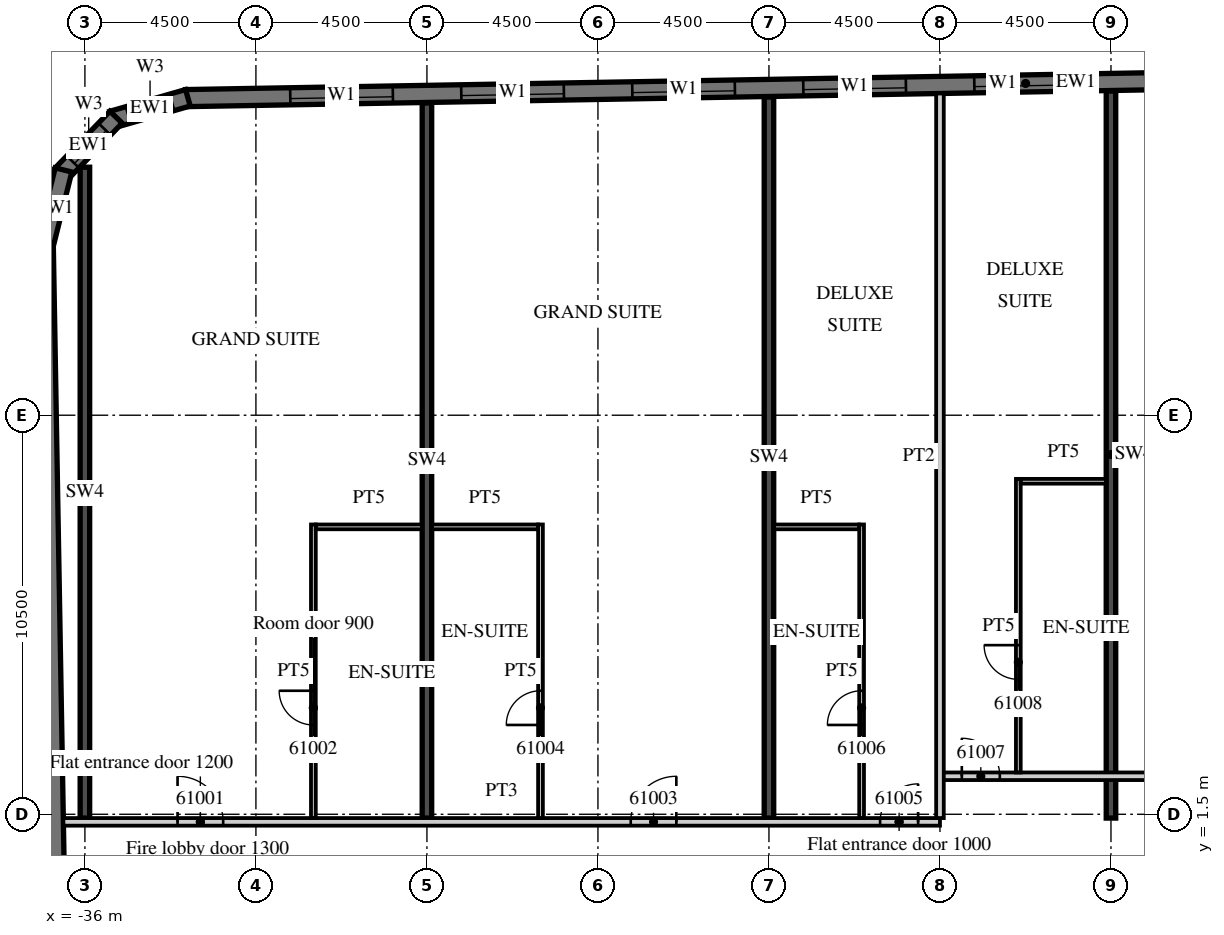
"""IFC4 building model, lengths in metres.
Left out: names, types, materials, properties, quantities, classifications, styles, units other than length and angle.
Written with IfcOpenShell. Run it as: python <this file> out.ifc"""

import sys

from ifc_helpers import new_model, si_unit, direction, frame, frame_2d, origin, place, context, subcontext, project, spatial, polyline, rectangle, outline, extrude, element, fill, save


model = new_model("IFC4")
c1 = context("Model", 3, precision=1e-05, world=origin(), true_north=direction((0.0, 1.0)))
c2 = subcontext(c1, "Body", "Model", "MODEL_VIEW")
j1 = project(units=[si_unit("LENGTHUNIT", "METRE"), si_unit("PLANEANGLEUNIT", "RADIAN")], contexts=[c1])
p1 = place(None, origin())
s1 = spatial("IfcSite", under=j1, at=p1, CompositionType="ELEMENT")
p2 = place(p1, origin())
s2 = spatial("IfcBuilding", under=s1, at=p2, CompositionType="ELEMENT")
p3 = place(p2, frame((0.0, 0.0, 247.4)))
s3 = spatial("IfcBuildingStorey", under=s2, at=p3, CompositionType="ELEMENT", Elevation=247.4)
p4 = place(p3, frame((-36.0, 1.4, 0.0), z_axis=(0.0, 0.0, 1.0), x_axis=(0.0, 1.0, 0.0)))
e1 = element("IfcWall", 1, at=p4, inside=s3, PredefinedType="SHEAR", context=c2, shape_type="SweptSolid", body=[
    extrude(rectangle(XDim=17.125, YDim=0.25, at=frame_2d((8.563, 0.0))), origin(), (0.0, 0.0, 1.0), 3.3),
])
p5 = place(p3, frame((-27.0, 1.4, 0.0), z_axis=(0.0, 0.0, 1.0), x_axis=(0.0, 1.0, 0.0)))
e2 = element("IfcWall", 2, at=p5, inside=s3, PredefinedType="SHEAR", context=c2, shape_type="SweptSolid", body=[
    extrude(rectangle(XDim=18.817, YDim=0.25, at=frame_2d((9.409, 0.0))), origin(), (0.0, 0.0, 1.0), 3.3),
])
p6 = place(p3, frame((-18.0, 1.4, 0.0), z_axis=(0.0, 0.0, 1.0), x_axis=(0.0, 1.0, 0.0)))
e3 = element("IfcWall", 3, at=p6, inside=s3, PredefinedType="SHEAR", context=c2, shape_type="SweptSolid", body=[
    extrude(rectangle(XDim=18.974, YDim=0.25, at=frame_2d((9.487, 0.0))), origin(), (0.0, 0.0, 1.0), 3.3),
])
p7 = place(p3, frame((-9.0, 1.4, 0.0), z_axis=(0.0, 0.0, 1.0), x_axis=(0.0, 1.0, 0.0)))
e4 = element("IfcWall", 4, at=p7, inside=s3, PredefinedType="SHEAR", context=c2, shape_type="SweptSolid", body=[
    extrude(rectangle(XDim=19.132, YDim=0.25, at=frame_2d((9.566, 0.0))), origin(), (0.0, 0.0, 1.0), 3.3),
])
p8 = place(p3, frame((-37.057, 16.503, 0.0), z_axis=(0.0, 0.0, 1.0), x_axis=(0.017452279857, -0.999847697366, 0.0)))
e5 = element("IfcWall", 5, at=p8, inside=s3, PredefinedType="SOLIDWALL", context=c2, shape_type="SweptSolid", body=[
    extrude(rectangle(XDim=33.0, YDim=0.45, at=frame_2d((16.5, 0.0))), origin(), (0.0, 0.0, 1.0), 3.02),
])
p9 = place(p3, frame((13.504, 21.161, 0.0), z_axis=(0.0, 0.0, 1.0), x_axis=(-0.999847763257, -0.017448504532, 0.0)))
e6 = element("IfcWall", 6, at=p9, inside=s3, PredefinedType="SOLIDWALL", context=c2, shape_type="SweptSolid", body=[
    extrude(rectangle(XDim=46.859, YDim=0.45, at=frame_2d((23.43, 0.0))), origin(), (0.0, 0.0, 1.0), 3.02),
])
p10 = place(p9, frame((0.9, 0.0, 0.45)))
e7 = element("IfcOpeningElement", 7, at=p10, cuts=e6, PredefinedType="OPENING", context=c2, shape_type="SweptSolid", body=[
    extrude(rectangle(XDim=2.7, YDim=2.25, at=frame_2d((1.35, 1.125))), frame((0.0, 0.235, 0.0), z_axis=(0.0, -1.0, 0.0), x_axis=(1.0, 0.0, 0.0)), (0.0, 0.0, 1.0), 0.47),
])
p11 = place(p9, frame((5.401, 0.0, 0.45)))
e8 = element("IfcOpeningElement", 8, at=p11, cuts=e6, PredefinedType="OPENING", context=c2, shape_type="SweptSolid", body=[
    extrude(rectangle(XDim=2.7, YDim=2.25, at=frame_2d((1.35, 1.125))), frame((0.0, 0.235, 0.0), z_axis=(0.0, -1.0, 0.0), x_axis=(1.0, 0.0, 0.0)), (0.0, 0.0, 1.0), 0.47),
])
p12 = place(p9, frame((9.902, 0.0, 0.45)))
e9 = element("IfcOpeningElement", 9, at=p12, cuts=e6, PredefinedType="OPENING", context=c2, shape_type="SweptSolid", body=[
    extrude(rectangle(XDim=2.7, YDim=2.25, at=frame_2d((1.35, 1.125))), frame((0.0, 0.235, 0.0), z_axis=(0.0, -1.0, 0.0), x_axis=(1.0, 0.0, 0.0)), (0.0, 0.0, 1.0), 0.47),
])
p13 = place(p9, frame((14.402, 0.0, 0.45)))
e10 = element("IfcOpeningElement", 10, at=p13, cuts=e6, PredefinedType="OPENING", context=c2, shape_type="SweptSolid", body=[
    extrude(rectangle(XDim=2.7, YDim=2.25, at=frame_2d((1.35, 1.125))), frame((0.0, 0.235, 0.0), z_axis=(0.0, -1.0, 0.0), x_axis=(1.0, 0.0, 0.0)), (0.0, 0.0, 1.0), 0.47),
])
p14 = place(p9, frame((18.903, 0.0, 0.45)))
e11 = element("IfcOpeningElement", 11, at=p14, cuts=e6, PredefinedType="OPENING", context=c2, shape_type="SweptSolid", body=[
    extrude(rectangle(XDim=2.7, YDim=2.25, at=frame_2d((1.35, 1.125))), frame((0.0, 0.235, 0.0), z_axis=(0.0, -1.0, 0.0), x_axis=(1.0, 0.0, 0.0)), (0.0, 0.0, 1.0), 0.47),
])
p15 = place(p9, frame((23.404, 0.0, 0.45)))
e12 = element("IfcOpeningElement", 12, at=p15, cuts=e6, PredefinedType="OPENING", context=c2, shape_type="SweptSolid", body=[
    extrude(rectangle(XDim=2.7, YDim=2.25, at=frame_2d((1.35, 1.125))), frame((0.0, 0.235, 0.0), z_axis=(0.0, -1.0, 0.0), x_axis=(1.0, 0.0, 0.0)), (0.0, 0.0, 1.0), 0.47),
])
p16 = place(p9, frame((27.904, 0.0, 0.45)))
e13 = element("IfcOpeningElement", 13, at=p16, cuts=e6, PredefinedType="OPENING", context=c2, shape_type="SweptSolid", body=[
    extrude(rectangle(XDim=2.7, YDim=2.25, at=frame_2d((1.35, 1.125))), frame((0.0, 0.235, 0.0), z_axis=(0.0, -1.0, 0.0), x_axis=(1.0, 0.0, 0.0)), (0.0, 0.0, 1.0), 0.47),
])
p17 = place(p9, frame((32.405, 0.0, 0.45)))
e14 = element("IfcOpeningElement", 14, at=p17, cuts=e6, PredefinedType="OPENING", context=c2, shape_type="SweptSolid", body=[
    extrude(rectangle(XDim=2.7, YDim=2.25, at=frame_2d((1.35, 1.125))), frame((0.0, 0.235, 0.0), z_axis=(0.0, -1.0, 0.0), x_axis=(1.0, 0.0, 0.0)), (0.0, 0.0, 1.0), 0.47),
])
p18 = place(p9, frame((36.906, 0.0, 0.45)))
e15 = element("IfcOpeningElement", 15, at=p18, cuts=e6, PredefinedType="OPENING", context=c2, shape_type="SweptSolid", body=[
    extrude(rectangle(XDim=2.7, YDim=2.25, at=frame_2d((1.35, 1.125))), frame((0.0, 0.235, 0.0), z_axis=(0.0, -1.0, 0.0), x_axis=(1.0, 0.0, 0.0)), (0.0, 0.0, 1.0), 0.47),
])
p19 = place(p9, frame((41.406, 0.0, 0.45)))
e16 = element("IfcOpeningElement", 16, at=p19, cuts=e6, PredefinedType="OPENING", context=c2, shape_type="SweptSolid", body=[
    extrude(rectangle(XDim=2.7, YDim=2.25, at=frame_2d((1.35, 1.125))), frame((0.0, 0.235, 0.0), z_axis=(0.0, -1.0, 0.0), x_axis=(1.0, 0.0, 0.0)), (0.0, 0.0, 1.0), 0.47),
])
p20 = place(p3, frame((-33.29, 20.352, 0.0), z_axis=(0.0, 0.0, 1.0), x_axis=(-0.961247584925, -0.275686562016, 0.0)))
e17 = element("IfcWall", 17, at=p20, inside=s3, PredefinedType="SOLIDWALL", context=c2, shape_type="SweptSolid", body=[
    extrude(outline(polyline([(0.0, -0.225), (2.071, -0.225), (1.95, 0.225), (0.121, 0.225), (0.0, -0.225)])), origin(), (0.0, 0.0, 1.0), 3.02),
])
p21 = place(p20, frame((0.435, 0.0, 0.45)))
e18 = element("IfcOpeningElement", 18, at=p21, cuts=e17, PredefinedType="OPENING", context=c2, shape_type="SweptSolid", body=[
    extrude(rectangle(XDim=1.2, YDim=2.25, at=frame_2d((0.6, 1.125))), frame((0.0, 0.235, 0.0), z_axis=(0.0, -1.0, 0.0), x_axis=(1.0, 0.0, 0.0)), (0.0, 0.0, 1.0), 0.47),
])
p22 = place(p3, frame((-35.181, 19.842, 0.0), z_axis=(0.0, 0.0, 1.0), x_axis=(-0.694678672846, -0.719320193998, 0.0)))
e19 = element("IfcWall", 19, at=p22, inside=s3, PredefinedType="SOLIDWALL", context=c2, shape_type="SweptSolid", body=[
    extrude(outline(polyline([(0.0, -0.225), (2.071, -0.225), (1.95, 0.225), (0.121, 0.225), (0.0, -0.225)])), origin(), (0.0, 0.0, 1.0), 3.02),
])
p23 = place(p22, frame((0.435, 0.0, 0.45)))
e20 = element("IfcOpeningElement", 20, at=p23, cuts=e19, PredefinedType="OPENING", context=c2, shape_type="SweptSolid", body=[
    extrude(rectangle(XDim=1.2, YDim=2.25, at=frame_2d((0.6, 1.125))), frame((0.0, 0.235, 0.0), z_axis=(0.0, -1.0, 0.0), x_axis=(1.0, 0.0, 0.0)), (0.0, 0.0, 1.0), 0.47),
])
p24 = place(p3, frame((-36.563, 18.454, 0.0), z_axis=(0.0, 0.0, 1.0), x_axis=(-0.241869623482, -0.970308757683, 0.0)))
e21 = element("IfcWall", 21, at=p24, inside=s3, PredefinedType="SOLIDWALL", context=c2, shape_type="SweptSolid", body=[
    extrude(outline(polyline([(-0.0, -0.225), (2.07, -0.225), (1.95, 0.225), (0.12, 0.225), (-0.0, -0.225)])), origin(), (0.0, 0.0, 1.0), 3.02),
])
p25 = place(p3, frame((-36.566, 1.3, 0.0), z_axis=(0.0, 0.0, 1.0), x_axis=(1.0, 0.0, 0.0)))
e22 = element("IfcWall", 22, at=p25, inside=s3, PredefinedType="PARTITIONING", context=c2, shape_type="SweptSolid", body=[
    extrude(rectangle(XDim=23.066, YDim=0.2, at=frame_2d((11.533, 0.0))), origin(), (0.0, 0.0, 1.0), 3.02),
])
p26 = place(p25, frame((3.004, 0.0, 0.0)))
e23 = element("IfcOpeningElement", 23, at=p26, cuts=e22, PredefinedType="OPENING", context=c2, shape_type="SweptSolid", body=[
    extrude(rectangle(XDim=1.2, YDim=2.1, at=frame_2d((0.6, 1.05))), frame((0.0, 0.11, 0.0), z_axis=(0.0, -1.0, 0.0), x_axis=(1.0, 0.0, 0.0)), (0.0, 0.0, 1.0), 0.22),
])
p27 = place(p25, frame((14.929, 0.0, 0.0)))
e24 = element("IfcOpeningElement", 24, at=p27, cuts=e22, PredefinedType="OPENING", context=c2, shape_type="SweptSolid", body=[
    extrude(rectangle(XDim=1.2, YDim=2.1, at=frame_2d((0.6, 1.05))), frame((0.0, 0.11, 0.0), z_axis=(0.0, -1.0, 0.0), x_axis=(1.0, 0.0, 0.0)), (0.0, 0.0, 1.0), 0.22),
])
p28 = place(p25, frame((21.491, 0.0, 0.0)))
e25 = element("IfcOpeningElement", 25, at=p28, cuts=e22, PredefinedType="OPENING", context=c2, shape_type="SweptSolid", body=[
    extrude(rectangle(XDim=1.0, YDim=2.1, at=frame_2d((0.5, 1.05))), frame((0.0, 0.11, 0.0), z_axis=(0.0, -1.0, 0.0), x_axis=(1.0, 0.0, 0.0)), (0.0, 0.0, 1.0), 0.22),
])
p29 = place(p3, frame((-13.5, 2.5, 0.0), z_axis=(0.0, 0.0, 1.0), x_axis=(1.0, 0.0, 0.0)))
e26 = element("IfcWall", 26, at=p29, inside=s3, PredefinedType="PARTITIONING", context=c2, shape_type="SweptSolid", body=[
    extrude(rectangle(XDim=27.0, YDim=0.2, at=frame_2d((13.5, 0.0))), origin(), (0.0, 0.0, 1.0), 3.02),
])
p30 = place(p29, frame((0.575, 0.0, 0.0)))
e27 = element("IfcOpeningElement", 27, at=p30, cuts=e26, PredefinedType="OPENING", context=c2, shape_type="SweptSolid", body=[
    extrude(rectangle(XDim=1.0, YDim=2.1, at=frame_2d((0.5, 1.05))), frame((0.0, 0.11, 0.0), z_axis=(0.0, -1.0, 0.0), x_axis=(1.0, 0.0, 0.0)), (0.0, 0.0, 1.0), 0.22),
])
p31 = place(p29, frame((6.938, 0.0, 0.0)))
e28 = element("IfcOpeningElement", 28, at=p31, cuts=e26, PredefinedType="OPENING", context=c2, shape_type="SweptSolid", body=[
    extrude(rectangle(XDim=1.2, YDim=2.1, at=frame_2d((0.6, 1.05))), frame((0.0, 0.11, 0.0), z_axis=(0.0, -1.0, 0.0), x_axis=(1.0, 0.0, 0.0)), (0.0, 0.0, 1.0), 0.22),
])
p32 = place(p29, frame((15.938, 0.0, 0.0)))
e29 = element("IfcOpeningElement", 29, at=p32, cuts=e26, PredefinedType="OPENING", context=c2, shape_type="SweptSolid", body=[
    extrude(rectangle(XDim=1.2, YDim=2.1, at=frame_2d((0.6, 1.05))), frame((0.0, 0.11, 0.0), z_axis=(0.0, -1.0, 0.0), x_axis=(1.0, 0.0, 0.0)), (0.0, 0.0, 1.0), 0.22),
])
p33 = place(p29, frame((23.075, 0.0, 0.0)))
e30 = element("IfcOpeningElement", 30, at=p33, cuts=e26, PredefinedType="OPENING", context=c2, shape_type="SweptSolid", body=[
    extrude(rectangle(XDim=1.0, YDim=2.1, at=frame_2d((0.5, 1.05))), frame((0.0, 0.11, 0.0), z_axis=(0.0, -1.0, 0.0), x_axis=(1.0, 0.0, 0.0)), (0.0, 0.0, 1.0), 0.22),
])
p34 = place(p3, frame((-29.988, 1.4, 0.0), z_axis=(0.0, 0.0, 1.0), x_axis=(0.0, 1.0, 0.0)))
e31 = element("IfcWall", 31, at=p34, inside=s3, PredefinedType="PARTITIONING", context=c2, shape_type="SweptSolid", body=[
    extrude(rectangle(XDim=7.725, YDim=0.125, at=frame_2d((3.863, 0.0))), origin(), (0.0, 0.0, 1.0), 3.02),
])
p35 = place(p34, frame((2.45, 0.0, 0.0)))
e32 = element("IfcOpeningElement", 32, at=p35, cuts=e31, PredefinedType="OPENING", context=c2, shape_type="SweptSolid", body=[
    extrude(rectangle(XDim=0.9, YDim=2.1, at=frame_2d((0.45, 1.05))), frame((0.0, 0.073, 0.0), z_axis=(0.0, -1.0, 0.0), x_axis=(1.0, 0.0, 0.0)), (0.0, 0.0, 1.0), 0.145),
])
p36 = place(p3, frame((-29.925, 9.062, 0.0), z_axis=(0.0, 0.0, 1.0), x_axis=(1.0, 0.0, 0.0)))
e33 = element("IfcWall", 33, at=p36, inside=s3, PredefinedType="PARTITIONING", context=c2, shape_type="SweptSolid", body=[
    extrude(rectangle(XDim=2.8, YDim=0.125, at=frame_2d((1.4, 0.0))), origin(), (0.0, 0.0, 1.0), 3.02),
])
p37 = place(p3, frame((-24.012, 1.4, 0.0), z_axis=(0.0, 0.0, 1.0), x_axis=(0.0, 1.0, 0.0)))
e34 = element("IfcWall", 34, at=p37, inside=s3, PredefinedType="PARTITIONING", context=c2, shape_type="SweptSolid", body=[
    extrude(rectangle(XDim=7.725, YDim=0.125, at=frame_2d((3.863, 0.0))), origin(), (0.0, 0.0, 1.0), 3.02),
])
p38 = place(p37, frame((2.45, 0.0, 0.0)))
e35 = element("IfcOpeningElement", 35, at=p38, cuts=e34, PredefinedType="OPENING", context=c2, shape_type="SweptSolid", body=[
    extrude(rectangle(XDim=0.9, YDim=2.1, at=frame_2d((0.45, 1.05))), frame((0.0, 0.073, 0.0), z_axis=(0.0, -1.0, 0.0), x_axis=(1.0, 0.0, 0.0)), (0.0, 0.0, 1.0), 0.145),
])
p39 = place(p3, frame((-26.875, 9.062, 0.0), z_axis=(0.0, 0.0, 1.0), x_axis=(1.0, 0.0, 0.0)))
e36 = element("IfcWall", 36, at=p39, inside=s3, PredefinedType="PARTITIONING", context=c2, shape_type="SweptSolid", body=[
    extrude(rectangle(XDim=2.8, YDim=0.125, at=frame_2d((1.4, 0.0))), origin(), (0.0, 0.0, 1.0), 3.02),
])
p40 = place(p3, frame((-13.5, 1.4, 0.0), z_axis=(0.0, 0.0, 1.0), x_axis=(0.0, 1.0, 0.0)))
e37 = element("IfcWall", 37, at=p40, inside=s3, PredefinedType="PARTITIONING", context=c2, shape_type="SweptSolid", body=[
    extrude(rectangle(XDim=19.065, YDim=0.2, at=frame_2d((9.533, 0.0))), origin(), (0.0, 0.0, 1.0), 3.02),
])
p41 = place(p3, frame((-15.562, 1.4, 0.0), z_axis=(0.0, 0.0, 1.0), x_axis=(0.0, 1.0, 0.0)))
e38 = element("IfcWall", 38, at=p41, inside=s3, PredefinedType="PARTITIONING", context=c2, shape_type="SweptSolid", body=[
    extrude(rectangle(XDim=7.725, YDim=0.125, at=frame_2d((3.863, 0.0))), origin(), (0.0, 0.0, 1.0), 3.02),
])
p42 = place(p41, frame((2.45, 0.0, 0.0)))
e39 = element("IfcOpeningElement", 39, at=p42, cuts=e38, PredefinedType="OPENING", context=c2, shape_type="SweptSolid", body=[
    extrude(rectangle(XDim=0.9, YDim=2.1, at=frame_2d((0.45, 1.05))), frame((0.0, 0.073, 0.0), z_axis=(0.0, -1.0, 0.0), x_axis=(1.0, 0.0, 0.0)), (0.0, 0.0, 1.0), 0.145),
])
p43 = place(p3, frame((-17.875, 9.062, 0.0), z_axis=(0.0, 0.0, 1.0), x_axis=(1.0, 0.0, 0.0)))
e40 = element("IfcWall", 40, at=p43, inside=s3, PredefinedType="PARTITIONING", context=c2, shape_type="SweptSolid", body=[
    extrude(rectangle(XDim=2.25, YDim=0.125, at=frame_2d((1.125, 0.0))), origin(), (0.0, 0.0, 1.0), 3.02),
])
p44 = place(p3, frame((-11.438, 2.6, 0.0), z_axis=(0.0, 0.0, 1.0), x_axis=(0.0, 1.0, 0.0)))
e41 = element("IfcWall", 41, at=p44, inside=s3, PredefinedType="PARTITIONING", context=c2, shape_type="SweptSolid", body=[
    extrude(rectangle(XDim=7.725, YDim=0.125, at=frame_2d((3.862, 0.0))), origin(), (0.0, 0.0, 1.0), 3.02),
])
p45 = place(p44, frame((2.45, 0.0, 0.0)))
e42 = element("IfcOpeningElement", 42, at=p45, cuts=e41, PredefinedType="OPENING", context=c2, shape_type="SweptSolid", body=[
    extrude(rectangle(XDim=0.9, YDim=2.1, at=frame_2d((0.45, 1.05))), frame((0.0, 0.073, 0.0), z_axis=(0.0, -1.0, 0.0), x_axis=(1.0, 0.0, 0.0)), (0.0, 0.0, 1.0), 0.145),
])
p46 = place(p3, frame((-11.375, 10.262, 0.0), z_axis=(0.0, 0.0, 1.0), x_axis=(1.0, 0.0, 0.0)))
e43 = element("IfcWall", 43, at=p46, inside=s3, PredefinedType="PARTITIONING", context=c2, shape_type="SweptSolid", body=[
    extrude(rectangle(XDim=2.25, YDim=0.125, at=frame_2d((1.125, 0.0))), origin(), (0.0, 0.0, 1.0), 3.02),
])
p47 = place(p15, origin())
e44 = element("IfcWindow", 44, at=p47, inside=s3, PartitioningType="SINGLE_PANEL", PredefinedType="WINDOW", context=c2, shape_type="SweptSolid", body=[
    extrude(rectangle(XDim=2.7, YDim=2.25, at=frame_2d((1.35, 1.125))), frame((0.0, 0.09, 0.0), z_axis=(0.0, -1.0, 0.0), x_axis=(1.0, 0.0, 0.0)), (0.0, 0.0, 1.0), 0.06),
])
fill(e12, e44)
p48 = place(p16, origin())
e45 = element("IfcWindow", 45, at=p48, inside=s3, PartitioningType="SINGLE_PANEL", PredefinedType="WINDOW", context=c2, shape_type="SweptSolid", body=[
    extrude(rectangle(XDim=2.7, YDim=2.25, at=frame_2d((1.35, 1.125))), frame((0.0, 0.09, 0.0), z_axis=(0.0, -1.0, 0.0), x_axis=(1.0, 0.0, 0.0)), (0.0, 0.0, 1.0), 0.06),
])
fill(e13, e45)
p49 = place(p17, origin())
e46 = element("IfcWindow", 46, at=p49, inside=s3, PartitioningType="SINGLE_PANEL", PredefinedType="WINDOW", context=c2, shape_type="SweptSolid", body=[
    extrude(rectangle(XDim=2.7, YDim=2.25, at=frame_2d((1.35, 1.125))), frame((0.0, 0.09, 0.0), z_axis=(0.0, -1.0, 0.0), x_axis=(1.0, 0.0, 0.0)), (0.0, 0.0, 1.0), 0.06),
])
fill(e14, e46)
p50 = place(p18, origin())
e47 = element("IfcWindow", 47, at=p50, inside=s3, PartitioningType="SINGLE_PANEL", PredefinedType="WINDOW", context=c2, shape_type="SweptSolid", body=[
    extrude(rectangle(XDim=2.7, YDim=2.25, at=frame_2d((1.35, 1.125))), frame((0.0, 0.09, 0.0), z_axis=(0.0, -1.0, 0.0), x_axis=(1.0, 0.0, 0.0)), (0.0, 0.0, 1.0), 0.06),
])
fill(e15, e47)
p51 = place(p19, origin())
e48 = element("IfcWindow", 48, at=p51, inside=s3, PartitioningType="SINGLE_PANEL", PredefinedType="WINDOW", context=c2, shape_type="SweptSolid", body=[
    extrude(rectangle(XDim=2.7, YDim=2.25, at=frame_2d((1.35, 1.125))), frame((0.0, 0.09, 0.0), z_axis=(0.0, -1.0, 0.0), x_axis=(1.0, 0.0, 0.0)), (0.0, 0.0, 1.0), 0.06),
])
fill(e16, e48)
p52 = place(p21, origin())
e49 = element("IfcWindow", 49, at=p52, inside=s3, PartitioningType="SINGLE_PANEL", PredefinedType="WINDOW", context=c2, shape_type="SweptSolid", body=[
    extrude(rectangle(XDim=1.2, YDim=2.25, at=frame_2d((0.6, 1.125))), frame((0.0, 0.09, 0.0), z_axis=(0.0, -1.0, 0.0), x_axis=(1.0, 0.0, 0.0)), (0.0, 0.0, 1.0), 0.06),
])
fill(e18, e49)
p53 = place(p23, origin())
e50 = element("IfcWindow", 50, at=p53, inside=s3, PartitioningType="SINGLE_PANEL", PredefinedType="WINDOW", context=c2, shape_type="SweptSolid", body=[
    extrude(rectangle(XDim=1.2, YDim=2.25, at=frame_2d((0.6, 1.125))), frame((0.0, 0.09, 0.0), z_axis=(0.0, -1.0, 0.0), x_axis=(1.0, 0.0, 0.0)), (0.0, 0.0, 1.0), 0.06),
])
fill(e20, e50)
p54 = place(p26, origin())
e51 = element("IfcDoor", 51, at=p54, inside=s3, OperationType="SINGLE_SWING_LEFT", PredefinedType="DOOR", context=c2, shape_type="SweptSolid", body=[
    extrude(rectangle(XDim=1.2, YDim=2.1, at=frame_2d((0.6, 1.05))), frame((0.0, 0.025, 0.0), z_axis=(0.0, -1.0, 0.0), x_axis=(1.0, 0.0, 0.0)), (0.0, 0.0, 1.0), 0.05),
])
fill(e23, e51)
p55 = place(p35, origin())
e52 = element("IfcDoor", 52, at=p55, inside=s3, OperationType="SINGLE_SWING_RIGHT", PredefinedType="DOOR", context=c2, shape_type="SweptSolid", body=[
    extrude(rectangle(XDim=0.9, YDim=2.1, at=frame_2d((0.45, 1.05))), frame((0.0, 0.025, 0.0), z_axis=(0.0, -1.0, 0.0), x_axis=(1.0, 0.0, 0.0)), (0.0, 0.0, 1.0), 0.05),
])
fill(e32, e52)
p56 = place(p27, origin())
e53 = element("IfcDoor", 53, at=p56, inside=s3, OperationType="SINGLE_SWING_RIGHT", PredefinedType="DOOR", context=c2, shape_type="SweptSolid", body=[
    extrude(rectangle(XDim=1.2, YDim=2.1, at=frame_2d((0.6, 1.05))), frame((0.0, 0.025, 0.0), z_axis=(0.0, -1.0, 0.0), x_axis=(1.0, 0.0, 0.0)), (0.0, 0.0, 1.0), 0.05),
])
fill(e24, e53)
p57 = place(p38, origin())
e54 = element("IfcDoor", 54, at=p57, inside=s3, OperationType="SINGLE_SWING_LEFT", PredefinedType="DOOR", context=c2, shape_type="SweptSolid", body=[
    extrude(rectangle(XDim=0.9, YDim=2.1, at=frame_2d((0.45, 1.05))), frame((0.0, 0.025, 0.0), z_axis=(0.0, -1.0, 0.0), x_axis=(1.0, 0.0, 0.0)), (0.0, 0.0, 1.0), 0.05),
])
fill(e35, e54)
p58 = place(p28, origin())
e55 = element("IfcDoor", 55, at=p58, inside=s3, OperationType="SINGLE_SWING_RIGHT", PredefinedType="DOOR", context=c2, shape_type="SweptSolid", body=[
    extrude(rectangle(XDim=1.0, YDim=2.1, at=frame_2d((0.5, 1.05))), frame((0.0, 0.025, 0.0), z_axis=(0.0, -1.0, 0.0), x_axis=(1.0, 0.0, 0.0)), (0.0, 0.0, 1.0), 0.05),
])
fill(e25, e55)
p59 = place(p42, origin())
e56 = element("IfcDoor", 56, at=p59, inside=s3, OperationType="SINGLE_SWING_LEFT", PredefinedType="DOOR", context=c2, shape_type="SweptSolid", body=[
    extrude(rectangle(XDim=0.9, YDim=2.1, at=frame_2d((0.45, 1.05))), frame((0.0, 0.025, 0.0), z_axis=(0.0, -1.0, 0.0), x_axis=(1.0, 0.0, 0.0)), (0.0, 0.0, 1.0), 0.05),
])
fill(e39, e56)
p60 = place(p30, origin())
e57 = element("IfcDoor", 57, at=p60, inside=s3, OperationType="SINGLE_SWING_LEFT", PredefinedType="DOOR", context=c2, shape_type="SweptSolid", body=[
    extrude(rectangle(XDim=1.0, YDim=2.1, at=frame_2d((0.5, 1.05))), frame((0.0, 0.025, 0.0), z_axis=(0.0, -1.0, 0.0), x_axis=(1.0, 0.0, 0.0)), (0.0, 0.0, 1.0), 0.05),
])
fill(e27, e57)
p61 = place(p45, origin())
e58 = element("IfcDoor", 58, at=p61, inside=s3, OperationType="SINGLE_SWING_RIGHT", PredefinedType="DOOR", context=c2, shape_type="SweptSolid", body=[
    extrude(rectangle(XDim=0.9, YDim=2.1, at=frame_2d((0.45, 1.05))), frame((0.0, 0.025, 0.0), z_axis=(0.0, -1.0, 0.0), x_axis=(1.0, 0.0, 0.0)), (0.0, 0.0, 1.0), 0.05),
])
fill(e42, e58)
save(model, sys.argv[1])
